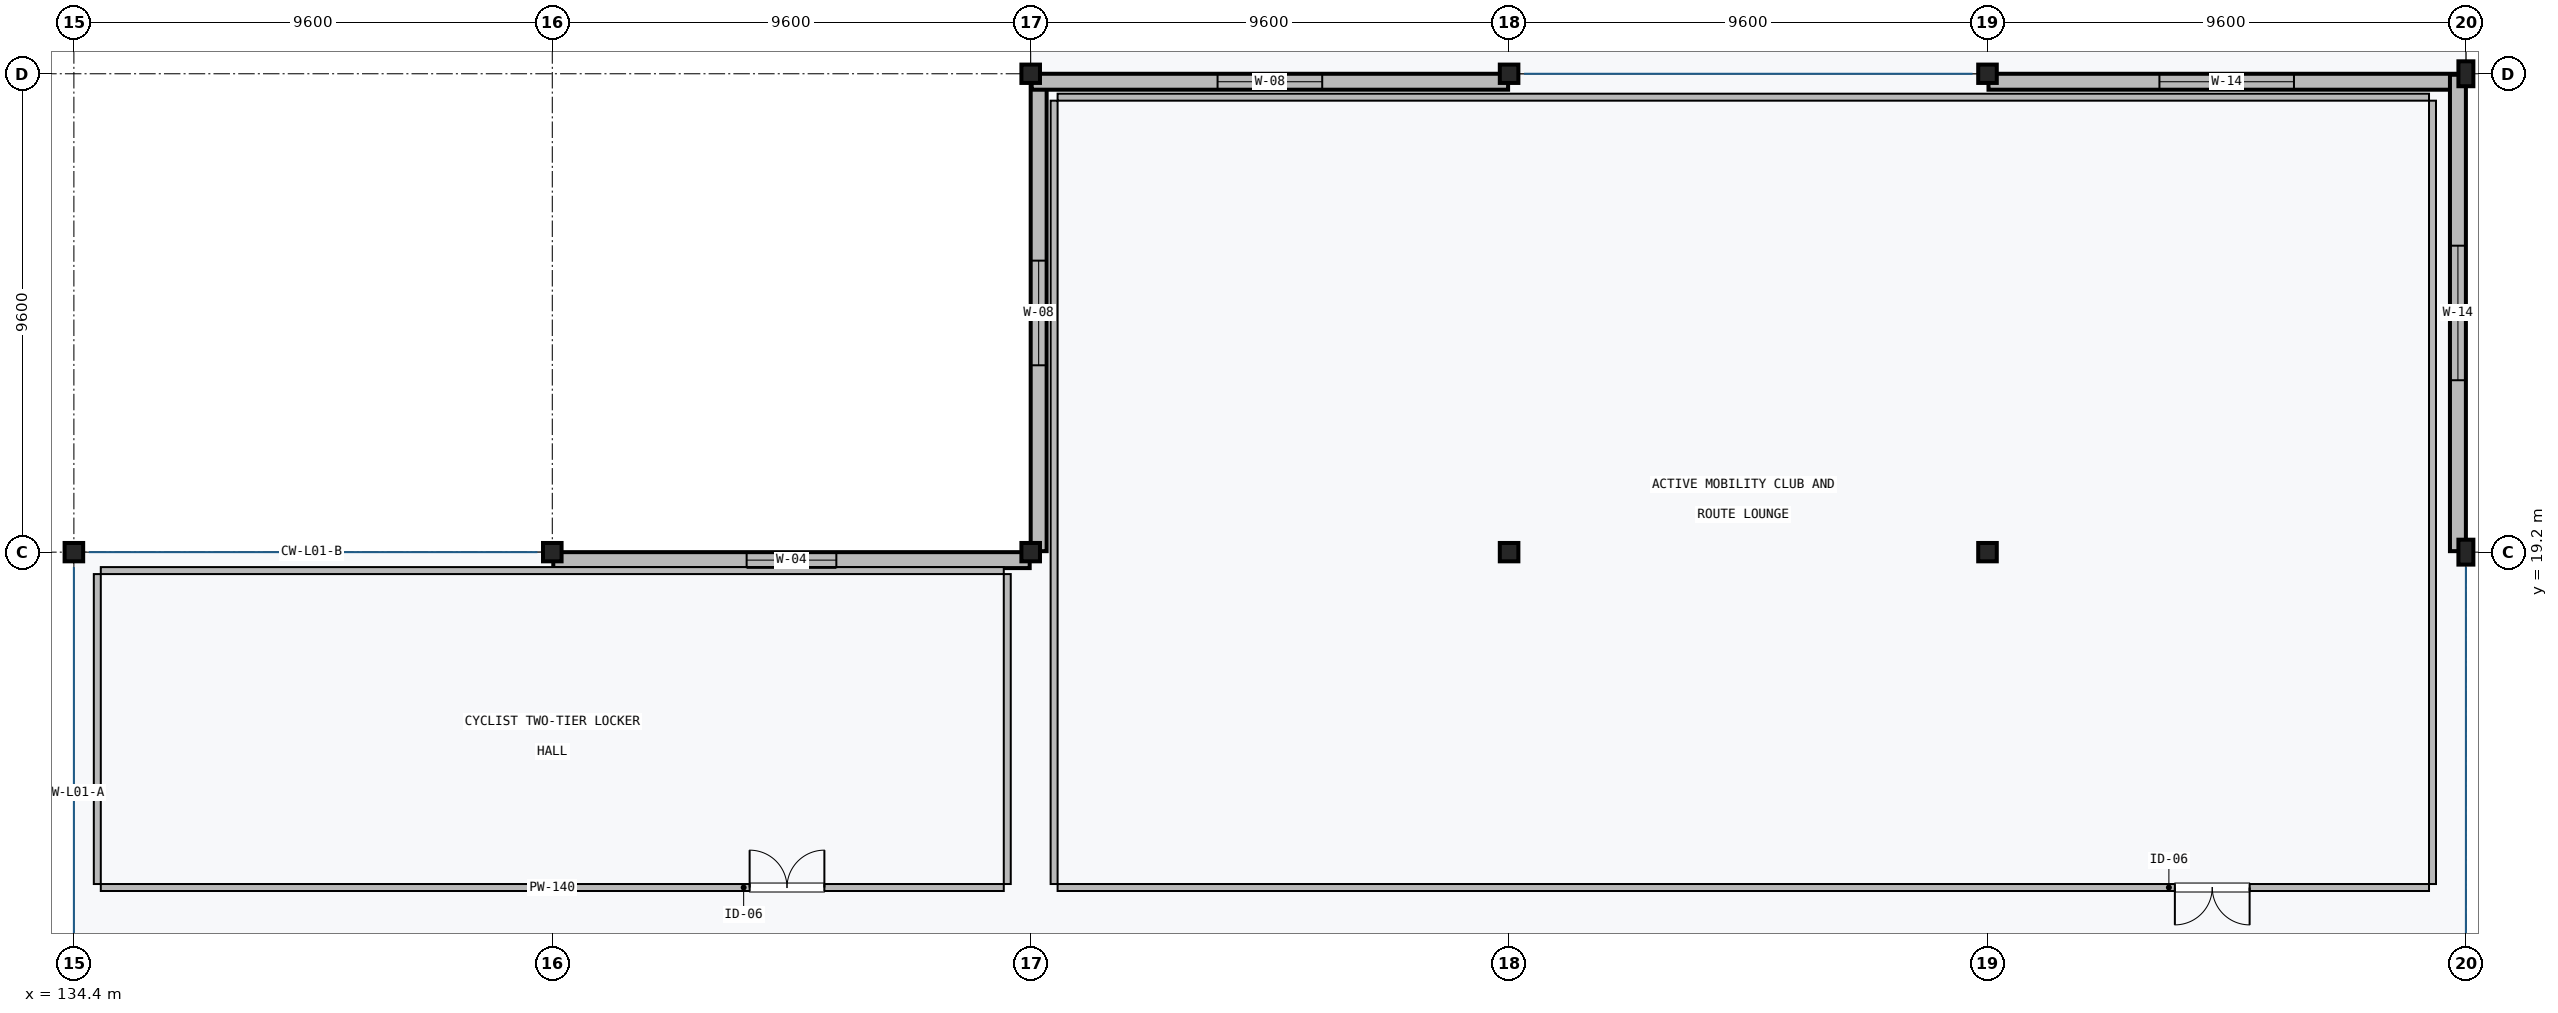
"""IFC4 building model, lengths in metres.
Left out: names, types, materials, properties, quantities, classifications, styles, units other than length and angle.
Written with IfcOpenShell. Run it as: python <this file> out.ifc"""

import sys

from ifc_helpers import new_model, si_unit, direction, frame, frame_2d, origin, origin_2d, place, context, subcontext, project, spatial, rectangle, i_section, extrude, element, fill, save


model = new_model("IFC4")
c1 = context("Model", 3, precision=1e-05, world=origin(), true_north=direction((0.0, 1.0)))
c2 = subcontext(c1, "Body", "Model", "MODEL_VIEW")
j1 = project(units=[si_unit("LENGTHUNIT", "METRE"), si_unit("PLANEANGLEUNIT", "RADIAN")], contexts=[c1])
p1 = place(None, origin())
s1 = spatial("IfcSite", under=j1, at=p1, CompositionType="ELEMENT")
p2 = place(p1, origin())
s2 = spatial("IfcBuilding", under=s1, at=p2, CompositionType="ELEMENT")
p3 = place(p2, frame((0.0, 0.0, 6.0)))
s3 = spatial("IfcBuildingStorey", under=s2, at=p3, CompositionType="ELEMENT", Elevation=6.0)
for number, where, z_axis, x_axis in (
    (1, (134.4, 19.2, 0.0), (0.0, 0.0, 1.0), (1.0, 0.0, 0.0)),
    (2, (144.0, 19.2, 0.0), (0.0, 0.0, 1.0), (1.0, 0.0, 0.0)),
    (3, (153.6, 19.2, 0.0), (0.0, 0.0, 1.0), (1.0, 0.0, 0.0)),
    (4, (153.6, 28.8, 0.0), (0.0, 0.0, 1.0), (1.0, 0.0, 0.0)),
    (5, (163.2, 19.2, 0.0), (0.0, 0.0, 1.0), (1.0, 0.0, 0.0)),
    (6, (163.2, 28.8, 0.0), (0.0, 0.0, 1.0), (1.0, 0.0, 0.0)),
    (7, (172.8, 19.2, 0.0), (0.0, 0.0, 1.0), (1.0, 0.0, 0.0)),
    (8, (172.8, 28.8, 0.0), (0.0, 0.0, 1.0), (1.0, 0.0, 0.0)),
):
    element("IfcColumn", number, at=place(p3, frame(where, z_axis=z_axis, x_axis=x_axis)), inside=s3, PredefinedType="COLUMN", context=c2, shape_type="SweptSolid", body=[
        extrude(i_section(OverallWidth=0.373, OverallDepth=0.368, WebThickness=0.014, FlangeThickness=0.024, FilletRadius=0.015, at=origin_2d()), origin(), (0.0, 0.0, 1.0), 4.25),
    ])
for number, where, z_axis, x_axis in (
    (9, (182.4, 19.2, 0.0), (0.0, 0.0, 1.0), (1.0, 0.0, 0.0)),
    (10, (182.4, 28.8, 0.0), (0.0, 0.0, 1.0), (1.0, 0.0, 0.0)),
):
    element("IfcColumn", number, at=place(p3, frame(where, z_axis=z_axis, x_axis=x_axis)), inside=s3, PredefinedType="COLUMN", context=c2, shape_type="SweptSolid", body=[
        extrude(i_section(OverallWidth=0.3, OverallDepth=0.5, WebThickness=0.014, FlangeThickness=0.028, FilletRadius=0.027, at=origin_2d()), origin(), (0.0, 0.0, 1.0), 4.25),
    ])
p4 = place(p3, frame((144.02, 19.04, 0.0), z_axis=(0.0, 0.0, 1.0), x_axis=(1.0, 0.0, 0.0)))
e11 = element("IfcWall", 11, at=p4, inside=s3, PredefinedType="SOLIDWALL", context=c2, shape_type="SweptSolid", body=[
    extrude(rectangle(XDim=9.56, YDim=0.32, at=frame_2d((4.78, 0.0))), origin(), (0.0, 0.0, 1.0), 3.9),
])
p5 = place(p4, frame((3.88, 0.0, 0.9)))
e12 = element("IfcOpeningElement", 12, at=p5, cuts=e11, PredefinedType="OPENING", context=c2, shape_type="SweptSolid", body=[
    extrude(rectangle(XDim=1.8, YDim=1.8, at=frame_2d((0.9, 0.9))), frame((0.0, 0.17, 0.0), z_axis=(0.0, -1.0, 0.0), x_axis=(1.0, 0.0, 0.0)), (0.0, 0.0, 1.0), 0.34),
])
p6 = place(p3, frame((153.76, 19.22, 0.0), z_axis=(0.0, 0.0, 1.0), x_axis=(0.0, 1.0, 0.0)))
e13 = element("IfcWall", 13, at=p6, inside=s3, PredefinedType="SOLIDWALL", context=c2, shape_type="SweptSolid", body=[
    extrude(rectangle(XDim=9.56, YDim=0.32, at=frame_2d((4.78, 0.0))), origin(), (0.0, 0.0, 1.0), 3.717),
])
p7 = place(p6, frame((3.73, 0.0, 0.9)))
e14 = element("IfcOpeningElement", 14, at=p7, cuts=e13, PredefinedType="OPENING", context=c2, shape_type="SweptSolid", body=[
    extrude(rectangle(XDim=2.1, YDim=1.5, at=frame_2d((1.05, 0.75))), frame((0.0, 0.17, 0.0), z_axis=(0.0, -1.0, 0.0), x_axis=(1.0, 0.0, 0.0)), (0.0, 0.0, 1.0), 0.34),
])
p8 = place(p3, frame((153.62, 28.64, 0.0), z_axis=(0.0, 0.0, 1.0), x_axis=(1.0, 0.0, 0.0)))
e15 = element("IfcWall", 15, at=p8, inside=s3, PredefinedType="SOLIDWALL", context=c2, shape_type="SweptSolid", body=[
    extrude(rectangle(XDim=9.56, YDim=0.32, at=frame_2d((4.78, 0.0))), origin(), (0.0, 0.0, 1.0), 3.9),
])
p9 = place(p8, frame((3.73, 0.0, 0.9)))
e16 = element("IfcOpeningElement", 16, at=p9, cuts=e15, PredefinedType="OPENING", context=c2, shape_type="SweptSolid", body=[
    extrude(rectangle(XDim=2.1, YDim=1.5, at=frame_2d((1.05, 0.75))), frame((0.0, 0.17, 0.0), z_axis=(0.0, -1.0, 0.0), x_axis=(1.0, 0.0, 0.0)), (0.0, 0.0, 1.0), 0.34),
])
p10 = place(p3, frame((172.82, 28.64, 0.0), z_axis=(0.0, 0.0, 1.0), x_axis=(1.0, 0.0, 0.0)))
e17 = element("IfcWall", 17, at=p10, inside=s3, PredefinedType="SOLIDWALL", context=c2, shape_type="SweptSolid", body=[
    extrude(rectangle(XDim=9.56, YDim=0.32, at=frame_2d((4.78, 0.0))), origin(), (0.0, 0.0, 1.0), 3.9),
])
p11 = place(p10, frame((3.43, 0.0, 0.9)))
e18 = element("IfcOpeningElement", 18, at=p11, cuts=e17, PredefinedType="OPENING", context=c2, shape_type="SweptSolid", body=[
    extrude(rectangle(XDim=2.7, YDim=2.4, at=frame_2d((1.35, 1.2))), frame((0.0, 0.17, 0.0), z_axis=(0.0, -1.0, 0.0), x_axis=(1.0, 0.0, 0.0)), (0.0, 0.0, 1.0), 0.34),
])
p12 = place(p3, frame((182.24, 28.78, 0.0), z_axis=(0.0, 0.0, 1.0), x_axis=(0.0, -1.0, 0.0)))
e19 = element("IfcWall", 19, at=p12, inside=s3, PredefinedType="SOLIDWALL", context=c2, shape_type="SweptSolid", body=[
    extrude(rectangle(XDim=9.56, YDim=0.32, at=frame_2d((4.78, 0.0))), origin(), (0.0, 0.0, 1.0), 3.717),
])
p13 = place(p12, frame((3.43, 0.0, 0.9)))
e20 = element("IfcOpeningElement", 20, at=p13, cuts=e19, PredefinedType="OPENING", context=c2, shape_type="SweptSolid", body=[
    extrude(rectangle(XDim=2.7, YDim=2.4, at=frame_2d((1.35, 1.2))), frame((0.0, 0.17, 0.0), z_axis=(0.0, -1.0, 0.0), x_axis=(1.0, 0.0, 0.0)), (0.0, 0.0, 1.0), 0.34),
])
p14 = place(p3, frame((153.06, 12.47, 0.0), z_axis=(0.0, 0.0, 1.0), x_axis=(-1.0, 0.0, 0.0)))
e21 = element("IfcWall", 21, at=p14, inside=s3, PredefinedType="PARTITIONING", context=c2, shape_type="SweptSolid", body=[
    extrude(rectangle(XDim=18.12, YDim=0.14, at=frame_2d((9.06, 0.0))), origin(), (0.0, 0.0, 1.0), 3.707),
])
p15 = place(p14, frame((3.6, 0.0, 0.0)))
e22 = element("IfcOpeningElement", 22, at=p15, cuts=e21, PredefinedType="OPENING", context=c2, shape_type="SweptSolid", body=[
    extrude(rectangle(XDim=1.5, YDim=2.25, at=frame_2d((0.75, 1.125))), frame((0.0, 0.08, 0.0), z_axis=(0.0, -1.0, 0.0), x_axis=(1.0, 0.0, 0.0)), (0.0, 0.0, 1.0), 0.16),
])
p16 = place(p3, frame((134.94, 18.83, 0.0), z_axis=(0.0, 0.0, 1.0), x_axis=(1.0, 0.0, 0.0)))
e23 = element("IfcWall", 23, at=p16, inside=s3, PredefinedType="PARTITIONING", context=c2, shape_type="SweptSolid", body=[
    extrude(rectangle(XDim=18.12, YDim=0.14, at=frame_2d((9.06, 0.0))), origin(), (0.0, 0.0, 1.0), 3.707),
])
for number, where, z_axis, x_axis in (
    (24, (134.87, 12.54, 0.0), (0.0, 0.0, 1.0), (0.0, 1.0, 0.0)),
    (25, (153.13, 18.76, 0.0), (0.0, 0.0, 1.0), (0.0, -1.0, 0.0)),
):
    element("IfcWall", number, at=place(p3, frame(where, z_axis=z_axis, x_axis=x_axis)), inside=s3, PredefinedType="PARTITIONING", context=c2, shape_type="SweptSolid", body=[
        extrude(rectangle(XDim=6.22, YDim=0.14, at=frame_2d((3.11, 0.0))), origin(), (0.0, 0.0, 1.0), 3.89),
    ])
p17 = place(p3, frame((181.66, 12.47, 0.0), z_axis=(0.0, 0.0, 1.0), x_axis=(-1.0, 0.0, 0.0)))
e26 = element("IfcWall", 26, at=p17, inside=s3, PredefinedType="PARTITIONING", context=c2, shape_type="SweptSolid", body=[
    extrude(rectangle(XDim=27.52, YDim=0.14, at=frame_2d((13.76, 0.0))), origin(), (0.0, 0.0, 1.0), 3.707),
])
p18 = place(p17, frame((3.6, 0.0, 0.0)))
e27 = element("IfcOpeningElement", 27, at=p18, cuts=e26, PredefinedType="OPENING", context=c2, shape_type="SweptSolid", body=[
    extrude(rectangle(XDim=1.5, YDim=2.25, at=frame_2d((0.75, 1.125))), frame((0.0, 0.08, 0.0), z_axis=(0.0, -1.0, 0.0), x_axis=(1.0, 0.0, 0.0)), (0.0, 0.0, 1.0), 0.16),
])
p19 = place(p3, frame((154.14, 28.33, 0.0), z_axis=(0.0, 0.0, 1.0), x_axis=(1.0, 0.0, 0.0)))
e28 = element("IfcWall", 28, at=p19, inside=s3, PredefinedType="PARTITIONING", context=c2, shape_type="SweptSolid", body=[
    extrude(rectangle(XDim=27.52, YDim=0.14, at=frame_2d((13.76, 0.0))), origin(), (0.0, 0.0, 1.0), 3.707),
])
for number, where, z_axis, x_axis in (
    (29, (154.07, 12.54, 0.0), (0.0, 0.0, 1.0), (0.0, 1.0, 0.0)),
    (30, (181.73, 28.26, 0.0), (0.0, 0.0, 1.0), (0.0, -1.0, 0.0)),
):
    element("IfcWall", number, at=place(p3, frame(where, z_axis=z_axis, x_axis=x_axis)), inside=s3, PredefinedType="PARTITIONING", context=c2, shape_type="SweptSolid", body=[
        extrude(rectangle(XDim=15.72, YDim=0.14, at=frame_2d((7.86, 0.0))), origin(), (0.0, 0.0, 1.0), 3.556),
    ])
p20 = place(p5, origin())
e31 = element("IfcWindow", 31, at=p20, inside=s3, PartitioningType="SINGLE_PANEL", PredefinedType="WINDOW", context=c2, shape_type="SweptSolid", body=[
    extrude(rectangle(XDim=1.8, YDim=1.8, at=frame_2d((0.9, 0.9))), frame((0.0, 0.03, 0.0), z_axis=(0.0, -1.0, 0.0), x_axis=(1.0, 0.0, 0.0)), (0.0, 0.0, 1.0), 0.06),
])
fill(e12, e31)
p21 = place(p7, origin())
e32 = element("IfcWindow", 32, at=p21, inside=s3, PartitioningType="SINGLE_PANEL", PredefinedType="WINDOW", context=c2, shape_type="SweptSolid", body=[
    extrude(rectangle(XDim=2.1, YDim=1.5, at=frame_2d((1.05, 0.75))), frame((0.0, 0.03, 0.0), z_axis=(0.0, -1.0, 0.0), x_axis=(1.0, 0.0, 0.0)), (0.0, 0.0, 1.0), 0.06),
])
fill(e14, e32)
p22 = place(p9, origin())
e33 = element("IfcWindow", 33, at=p22, inside=s3, PartitioningType="SINGLE_PANEL", PredefinedType="WINDOW", context=c2, shape_type="SweptSolid", body=[
    extrude(rectangle(XDim=2.1, YDim=1.5, at=frame_2d((1.05, 0.75))), frame((0.0, 0.03, 0.0), z_axis=(0.0, -1.0, 0.0), x_axis=(1.0, 0.0, 0.0)), (0.0, 0.0, 1.0), 0.06),
])
fill(e16, e33)
p23 = place(p11, origin())
e34 = element("IfcWindow", 34, at=p23, inside=s3, PartitioningType="SINGLE_PANEL", PredefinedType="WINDOW", context=c2, shape_type="SweptSolid", body=[
    extrude(rectangle(XDim=2.7, YDim=2.4, at=frame_2d((1.35, 1.2))), frame((0.0, 0.03, 0.0), z_axis=(0.0, -1.0, 0.0), x_axis=(1.0, 0.0, 0.0)), (0.0, 0.0, 1.0), 0.06),
])
fill(e18, e34)
p24 = place(p13, origin())
e35 = element("IfcWindow", 35, at=p24, inside=s3, PartitioningType="SINGLE_PANEL", PredefinedType="WINDOW", context=c2, shape_type="SweptSolid", body=[
    extrude(rectangle(XDim=2.7, YDim=2.4, at=frame_2d((1.35, 1.2))), frame((0.0, 0.03, 0.0), z_axis=(0.0, -1.0, 0.0), x_axis=(1.0, 0.0, 0.0)), (0.0, 0.0, 1.0), 0.06),
])
fill(e20, e35)
p25 = place(p15, frame((1.5, 0.0, 0.0), z_axis=(0.0, 0.0, 1.0), x_axis=(-1.0, 0.0, 0.0)))
e36 = element("IfcDoor", 36, at=p25, inside=s3, OperationType="DOUBLE_DOOR_SINGLE_SWING", PredefinedType="DOOR", context=c2, shape_type="SweptSolid", body=[
    extrude(rectangle(XDim=1.5, YDim=2.25, at=frame_2d((0.75, 1.125))), frame((0.0, 0.025, 0.0), z_axis=(0.0, -1.0, 0.0), x_axis=(1.0, 0.0, 0.0)), (0.0, 0.0, 1.0), 0.05),
])
fill(e22, e36)
p26 = place(p18, origin())
e37 = element("IfcDoor", 37, at=p26, inside=s3, OperationType="DOUBLE_DOOR_SINGLE_SWING", PredefinedType="DOOR", context=c2, shape_type="SweptSolid", body=[
    extrude(rectangle(XDim=1.5, YDim=2.25, at=frame_2d((0.75, 1.125))), frame((0.0, 0.025, 0.0), z_axis=(0.0, -1.0, 0.0), x_axis=(1.0, 0.0, 0.0)), (0.0, 0.0, 1.0), 0.05),
])
fill(e27, e37)
save(model, sys.argv[1])
